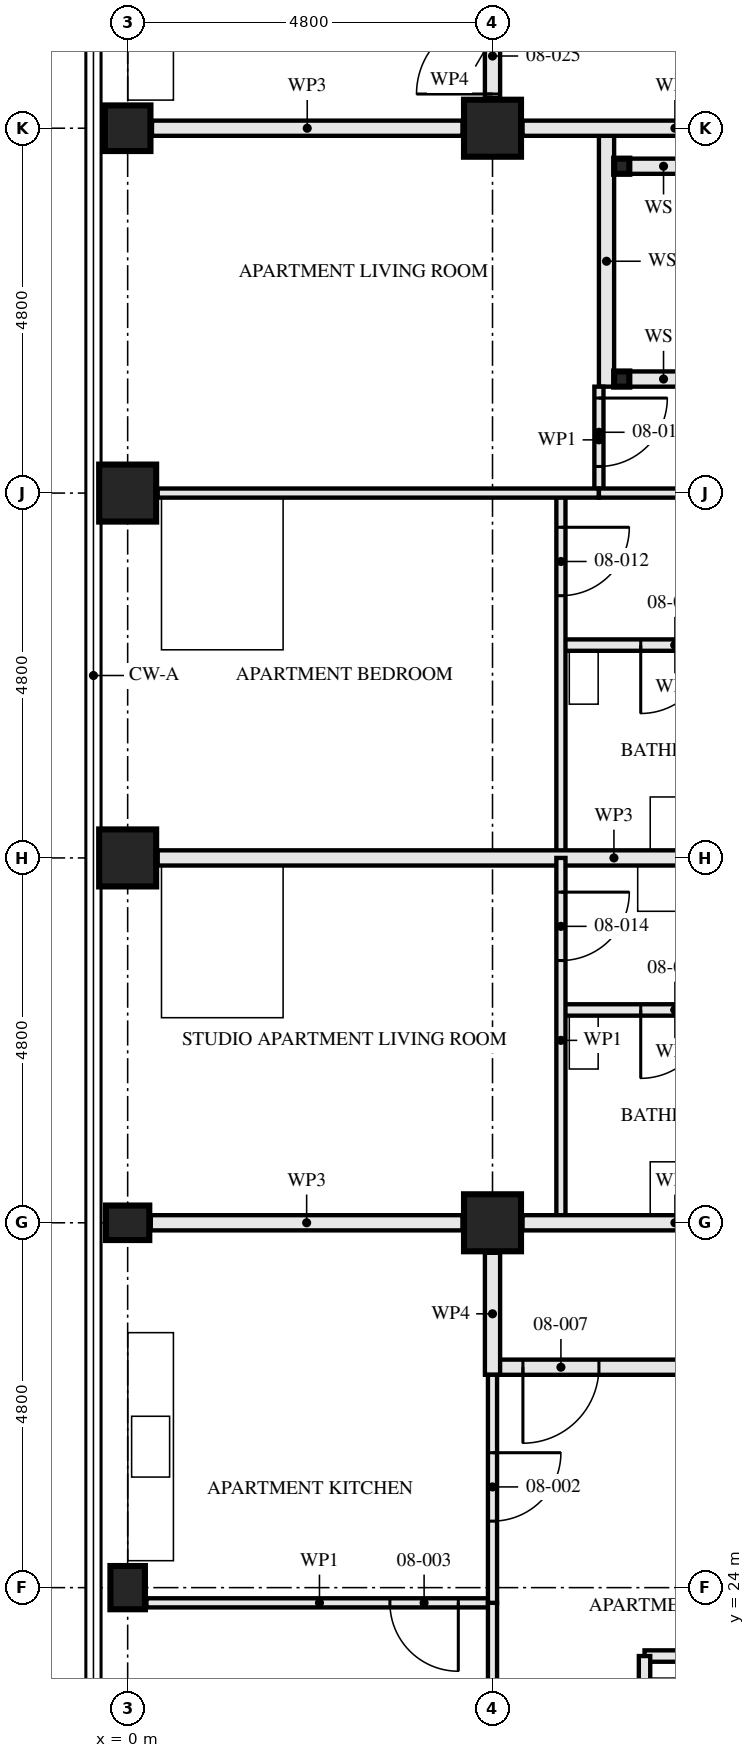
"""IFC4 building model, lengths in metres.
Left out: names, types, materials, properties, quantities, classifications, styles, units other than length and angle.
Written with IfcOpenShell. Run it as: python <this file> out.ifc"""

import sys

from ifc_helpers import new_model, si_unit, direction, frame, frame_2d, origin, origin_2d, place, context, subcontext, project, spatial, rectangle, hollow_rectangle, i_section, extrude, element, fill, save


model = new_model("IFC4")
c1 = context("Model", 3, precision=1e-05, world=origin(), true_north=direction((0.0, 1.0)))
c2 = subcontext(c1, "Body", "Model", "MODEL_VIEW")
j1 = project(units=[si_unit("LENGTHUNIT", "METRE"), si_unit("PLANEANGLEUNIT", "RADIAN")], contexts=[c1])
p1 = place(None, origin())
s1 = spatial("IfcSite", under=j1, at=p1, CompositionType="ELEMENT")
p2 = place(p1, origin())
s2 = spatial("IfcBuilding", under=s1, at=p2, CompositionType="ELEMENT")
p3 = place(p2, frame((0.0, 0.0, 34.0)))
s3 = spatial("IfcBuildingStorey", under=s2, at=p3, CompositionType="ELEMENT", Elevation=34.0)
for number, where, z_axis, x_axis in (
    (1, (0.0, 24.0, 0.0), (0.0, 0.0, 1.0), (1.0, 0.0, 0.0)),
    (2, (0.0, 28.8, 0.0), (0.0, 0.0, 1.0), (0.0, 1.0, 0.0)),
):
    element("IfcColumn", number, at=place(p3, frame(where, z_axis=z_axis, x_axis=x_axis)), inside=s3, PredefinedType="COLUMN", context=c2, shape_type="SweptSolid", body=[
        extrude(i_section(OverallWidth=0.454, OverallDepth=0.569, WebThickness=0.078, FlangeThickness=0.125, FilletRadius=0.015, at=origin_2d()), origin(), (0.0, 0.0, 1.0), 3.5),
    ])
for number, where, z_axis, x_axis in (
    (3, (0.0, 33.6, 0.0), (0.0, 0.0, 1.0), (1.0, 0.0, 0.0)),
    (4, (0.0, 38.4, 0.0), (0.0, 0.0, 1.0), (1.0, 0.0, 0.0)),
):
    element("IfcColumn", number, at=place(p3, frame(where, z_axis=z_axis, x_axis=x_axis)), inside=s3, PredefinedType="COLUMN", context=c2, shape_type="SweptSolid", body=[
        extrude(hollow_rectangle(XDim=0.75, YDim=0.75, WallThickness=0.08, at=origin_2d()), origin(), (0.0, 0.0, 1.0), 3.5),
    ])
p4 = place(p3, frame((0.0, 43.2, 0.0), z_axis=(0.0, 0.0, 1.0), x_axis=(0.0, 1.0, 0.0)))
e5 = element("IfcColumn", 5, at=p4, inside=s3, PredefinedType="COLUMN", context=c2, shape_type="SweptSolid", body=[
    extrude(hollow_rectangle(XDim=0.6, YDim=0.6, WallThickness=0.08, at=origin_2d()), origin(), (0.0, 0.0, 1.0), 3.5),
])
for number, where, z_axis, x_axis in (
    (6, (4.8, 28.8, 0.0), (0.0, 0.0, 1.0), (0.0, 1.0, 0.0)),
    (7, (4.8, 43.2, 0.0), (0.0, 0.0, 1.0), (0.0, 1.0, 0.0)),
):
    element("IfcColumn", number, at=place(p3, frame(where, z_axis=z_axis, x_axis=x_axis)), inside=s3, PredefinedType="COLUMN", context=c2, shape_type="SweptSolid", body=[
        extrude(hollow_rectangle(XDim=0.75, YDim=0.75, WallThickness=0.08, at=origin_2d()), origin(), (0.0, 0.0, 1.0), 3.5),
    ])
for number, where, z_axis, x_axis in (
    (8, (6.5, 42.7, 0.0), (0.0, 0.0, 1.0), (1.0, 0.0, 0.0)),
    (9, (6.5, 39.9, 0.0), (0.0, 0.0, 1.0), (1.0, 0.0, 0.0)),
):
    element("IfcColumn", number, at=place(p3, frame(where, z_axis=z_axis, x_axis=x_axis)), inside=s3, PredefinedType="COLUMN", context=c2, shape_type="SweptSolid", body=[
        extrude(hollow_rectangle(XDim=0.2, YDim=0.2, WallThickness=0.008, at=origin_2d()), origin(), (0.0, 0.0, 1.0), 3.33),
    ])
p5 = place(p3, frame((6.8, 20.1, 0.0), z_axis=(0.0, 0.0, 1.0), x_axis=(0.0, 1.0, 0.0)))
e10 = element("IfcWall", 10, at=p5, inside=s3, PredefinedType="PARTITIONING", context=c2, shape_type="SweptSolid", body=[
    extrude(rectangle(XDim=3.0, YDim=0.15, at=frame_2d((1.5, 0.0))), origin(), (0.0, 0.0, 1.0), 3.33),
])
p6 = place(p5, frame((1.05, 0.0, 0.0)))
e11 = element("IfcOpeningElement", 11, at=p6, cuts=e10, PredefinedType="OPENING", context=c2, shape_type="SweptSolid", body=[
    extrude(rectangle(XDim=0.9, YDim=2.1, at=frame_2d((0.45, 1.05))), frame((0.0, 0.085, 0.0), z_axis=(0.0, -1.0, 0.0), x_axis=(1.0, 0.0, 0.0)), (0.0, 0.0, 1.0), 0.171),
])
p7 = place(p3, frame((6.8, 23.1, 0.0), z_axis=(0.0, 0.0, 1.0), x_axis=(1.0, 0.0, 0.0)))
e12 = element("IfcWall", 12, at=p7, inside=s3, PredefinedType="PARTITIONING", context=c2, shape_type="SweptSolid", body=[
    extrude(rectangle(XDim=2.8, YDim=0.15, at=frame_2d((1.4, 0.0))), origin(), (0.0, 0.0, 1.0), 3.33),
])
p8 = place(p3, frame((4.8, 23.8, 0.0), z_axis=(0.0, 0.0, 1.0), x_axis=(0.0, 1.0, 0.0)))
e13 = element("IfcWall", 13, at=p8, inside=s3, PredefinedType="PARTITIONING", context=c2, shape_type="SweptSolid", body=[
    extrude(rectangle(XDim=3.0, YDim=0.12, at=frame_2d((1.5, 0.0))), origin(), (0.0, 0.0, 1.0), 2.55),
])
p9 = place(p8, frame((1.075, 0.0, 0.0)))
e14 = element("IfcOpeningElement", 14, at=p9, cuts=e13, PredefinedType="OPENING", context=c2, shape_type="SweptSolid", body=[
    extrude(rectangle(XDim=0.9, YDim=2.1, at=frame_2d((0.45, 1.05))), frame((0.0, 0.071, 0.0), z_axis=(0.0, -1.0, 0.0), x_axis=(1.0, 0.0, 0.0)), (0.0, 0.0, 1.0), 0.141),
])
p10 = place(p3, frame((0.247, 23.8, 0.0), z_axis=(0.0, 0.0, 1.0), x_axis=(1.0, 0.0, 0.0)))
e15 = element("IfcWall", 15, at=p10, inside=s3, PredefinedType="PARTITIONING", context=c2, shape_type="SweptSolid", body=[
    extrude(rectangle(XDim=4.553, YDim=0.12, at=frame_2d((2.276, 0.0))), origin(), (0.0, 0.0, 1.0), 3.33),
])
p11 = place(p10, frame((3.203, 0.0, 0.0)))
e16 = element("IfcOpeningElement", 16, at=p11, cuts=e15, PredefinedType="OPENING", context=c2, shape_type="SweptSolid", body=[
    extrude(rectangle(XDim=0.9, YDim=2.1, at=frame_2d((0.45, 1.05))), frame((0.0, 0.071, 0.0), z_axis=(0.0, -1.0, 0.0), x_axis=(1.0, 0.0, 0.0)), (0.0, 0.0, 1.0), 0.141),
])
p12 = place(p3, frame((4.8, 19.52, 0.0), z_axis=(0.0, 0.0, 1.0), x_axis=(0.0, 1.0, 0.0)))
e17 = element("IfcWall", 17, at=p12, inside=s3, PredefinedType="PARTITIONING", context=c2, shape_type="SweptSolid", body=[
    extrude(rectangle(XDim=4.28, YDim=0.12, at=frame_2d((2.14, 0.0))), origin(), (0.0, 0.0, 1.0), 3.33),
])
p13 = place(p3, frame((4.8, 26.9, 0.0), z_axis=(0.0, 0.0, 1.0), x_axis=(1.0, 0.0, 0.0)))
e18 = element("IfcWall", 18, at=p13, inside=s3, PredefinedType="PARTITIONING", context=c2, shape_type="SweptSolid", body=[
    extrude(rectangle(XDim=9.6, YDim=0.2, at=frame_2d((4.8, 0.0))), origin(), (0.0, 0.0, 1.0), 3.33),
])
p14 = place(p13, frame((0.4, 0.0, 0.0)))
e19 = element("IfcOpeningElement", 19, at=p14, cuts=e18, PredefinedType="OPENING", context=c2, shape_type="SweptSolid", body=[
    extrude(rectangle(XDim=1.0, YDim=2.1, at=frame_2d((0.5, 1.05))), frame((0.0, 0.111, 0.0), z_axis=(0.0, -1.0, 0.0), x_axis=(1.0, 0.0, 0.0)), (0.0, 0.0, 1.0), 0.221),
])
p15 = place(p13, frame((5.2, 0.0, 0.0)))
e20 = element("IfcOpeningElement", 20, at=p15, cuts=e18, PredefinedType="OPENING", context=c2, shape_type="SweptSolid", body=[
    extrude(rectangle(XDim=1.0, YDim=2.1, at=frame_2d((0.5, 1.05))), frame((0.0, 0.111, 0.0), z_axis=(0.0, -1.0, 0.0), x_axis=(1.0, 0.0, 0.0)), (0.0, 0.0, 1.0), 0.221),
])
p16 = place(p3, frame((4.8, 26.8, 0.0), z_axis=(0.0, 0.0, 1.0), x_axis=(0.0, 1.0, 0.0)))
e21 = element("IfcWall", 21, at=p16, inside=s3, PredefinedType="PARTITIONING", context=c2, shape_type="SweptSolid", body=[
    extrude(rectangle(XDim=1.605, YDim=0.2, at=frame_2d((0.802, 0.0))), origin(), (0.0, 0.0, 1.0), 3.33),
])
for number, where, z_axis, x_axis in (
    (22, (6.6, 42.7, 0.0), (0.0, 0.0, 1.0), (1.0, 0.0, 0.0)),
    (23, (6.6, 39.9, 0.0), (0.0, 0.0, 1.0), (1.0, 0.0, 0.0)),
):
    element("IfcWall", number, at=place(p3, frame(where, z_axis=z_axis, x_axis=x_axis)), inside=s3, PredefinedType="SOLIDWALL", context=c2, shape_type="SweptSolid", body=[
        extrude(rectangle(XDim=0.9, YDim=0.2, at=frame_2d((0.45, 0.0))), origin(), (0.0, 0.0, 1.0), 2.99),
    ])
p17 = place(p3, frame((6.3, 43.1, 0.0), z_axis=(0.0, 0.0, 1.0), x_axis=(0.0, -1.0, 0.0)))
e24 = element("IfcWall", 24, at=p17, inside=s3, PredefinedType="SOLIDWALL", context=c2, shape_type="SweptSolid", body=[
    extrude(rectangle(XDim=3.3, YDim=0.2, at=frame_2d((1.65, 0.0))), origin(), (0.0, 0.0, 1.0), 3.33),
])
p18 = place(p3, frame((5.7, 36.4, 0.0), z_axis=(0.0, 0.0, 1.0), x_axis=(1.0, 0.0, 0.0)))
e25 = element("IfcWall", 25, at=p18, inside=s3, PredefinedType="PARTITIONING", context=c2, shape_type="SweptSolid", body=[
    extrude(rectangle(XDim=3.0, YDim=0.15, at=frame_2d((1.5, 0.0))), origin(), (0.0, 0.0, 1.0), 3.33),
])
p19 = place(p18, frame((1.05, 0.0, 0.0)))
e26 = element("IfcOpeningElement", 26, at=p19, cuts=e25, PredefinedType="OPENING", context=c2, shape_type="SweptSolid", body=[
    extrude(rectangle(XDim=0.9, YDim=2.1, at=frame_2d((0.45, 1.05))), frame((0.0, 0.085, 0.0), z_axis=(0.0, -1.0, 0.0), x_axis=(1.0, 0.0, 0.0)), (0.0, 0.0, 1.0), 0.171),
])
p20 = place(p3, frame((6.2, 38.4, 0.0), z_axis=(0.0, 0.0, 1.0), x_axis=(1.0, 0.0, 0.0)))
e27 = element("IfcWall", 27, at=p20, inside=s3, PredefinedType="PARTITIONING", context=c2, shape_type="SweptSolid", body=[
    extrude(rectangle(XDim=6.25, YDim=0.12, at=frame_2d((3.125, 0.0))), origin(), (0.0, 0.0, 1.0), 2.55),
])
p21 = place(p20, frame((2.675, 0.0, 0.0)))
e28 = element("IfcOpeningElement", 28, at=p21, cuts=e27, PredefinedType="OPENING", context=c2, shape_type="SweptSolid", body=[
    extrude(rectangle(XDim=0.9, YDim=2.1, at=frame_2d((0.45, 1.05))), frame((0.0, 0.071, 0.0), z_axis=(0.0, -1.0, 0.0), x_axis=(1.0, 0.0, 0.0)), (0.0, 0.0, 1.0), 0.141),
])
p22 = place(p3, frame((6.2, 39.8, 0.0), z_axis=(0.0, 0.0, 1.0), x_axis=(0.0, -1.0, 0.0)))
e29 = element("IfcWall", 29, at=p22, inside=s3, PredefinedType="PARTITIONING", context=c2, shape_type="SweptSolid", body=[
    extrude(rectangle(XDim=1.4, YDim=0.12, at=frame_2d((0.7, 0.0))), origin(), (0.0, 0.0, 1.0), 3.33),
])
p23 = place(p22, frame((0.15, 0.0, 0.0)))
e30 = element("IfcOpeningElement", 30, at=p23, cuts=e29, PredefinedType="OPENING", context=c2, shape_type="SweptSolid", body=[
    extrude(rectangle(XDim=0.9, YDim=2.1, at=frame_2d((0.45, 1.05))), frame((0.0, 0.071, 0.0), z_axis=(0.0, -1.0, 0.0), x_axis=(1.0, 0.0, 0.0)), (0.0, 0.0, 1.0), 0.141),
])
p24 = place(p3, frame((5.7, 38.4, 0.0), z_axis=(0.0, 0.0, 1.0), x_axis=(0.0, -1.0, 0.0)))
e31 = element("IfcWall", 31, at=p24, inside=s3, PredefinedType="PARTITIONING", context=c2, shape_type="SweptSolid", body=[
    extrude(rectangle(XDim=4.8, YDim=0.12, at=frame_2d((2.4, 0.0))), origin(), (0.0, 0.0, 1.0), 3.33),
])
p25 = place(p24, frame((0.45, 0.0, 0.0)))
e32 = element("IfcOpeningElement", 32, at=p25, cuts=e31, PredefinedType="OPENING", context=c2, shape_type="SweptSolid", body=[
    extrude(rectangle(XDim=0.9, YDim=2.1, at=frame_2d((0.45, 1.05))), frame((0.0, 0.071, 0.0), z_axis=(0.0, -1.0, 0.0), x_axis=(1.0, 0.0, 0.0)), (0.0, 0.0, 1.0), 0.141),
])
p26 = place(p3, frame((0.395, 38.4, 0.0), z_axis=(0.0, 0.0, 1.0), x_axis=(1.0, 0.0, 0.0)))
e33 = element("IfcWall", 33, at=p26, inside=s3, PredefinedType="PARTITIONING", context=c2, shape_type="SweptSolid", body=[
    extrude(rectangle(XDim=5.805, YDim=0.12, at=frame_2d((2.902, 0.0))), origin(), (0.0, 0.0, 1.0), 2.55),
])
p27 = place(p3, frame((0.395, 33.6, 0.0), z_axis=(0.0, 0.0, 1.0), x_axis=(1.0, 0.0, 0.0)))
e34 = element("IfcWall", 34, at=p27, inside=s3, PredefinedType="PARTITIONING", context=c2, shape_type="SweptSolid", body=[
    extrude(rectangle(XDim=12.005, YDim=0.2, at=frame_2d((6.002, 0.0))), origin(), (0.0, 0.0, 1.0), 2.55),
])
p28 = place(p3, frame((5.7, 31.6, 0.0), z_axis=(0.0, 0.0, 1.0), x_axis=(1.0, 0.0, 0.0)))
e35 = element("IfcWall", 35, at=p28, inside=s3, PredefinedType="PARTITIONING", context=c2, shape_type="SweptSolid", body=[
    extrude(rectangle(XDim=3.0, YDim=0.15, at=frame_2d((1.5, 0.0))), origin(), (0.0, 0.0, 1.0), 3.33),
])
p29 = place(p28, frame((1.05, 0.0, 0.0)))
e36 = element("IfcOpeningElement", 36, at=p29, cuts=e35, PredefinedType="OPENING", context=c2, shape_type="SweptSolid", body=[
    extrude(rectangle(XDim=0.9, YDim=2.1, at=frame_2d((0.45, 1.05))), frame((0.0, 0.085, 0.0), z_axis=(0.0, -1.0, 0.0), x_axis=(1.0, 0.0, 0.0)), (0.0, 0.0, 1.0), 0.171),
])
p30 = place(p3, frame((5.7, 33.6, 0.0), z_axis=(0.0, 0.0, 1.0), x_axis=(0.0, -1.0, 0.0)))
e37 = element("IfcWall", 37, at=p30, inside=s3, PredefinedType="PARTITIONING", context=c2, shape_type="SweptSolid", body=[
    extrude(rectangle(XDim=4.8, YDim=0.12, at=frame_2d((2.4, 0.0))), origin(), (0.0, 0.0, 1.0), 3.33),
])
p31 = place(p30, frame((0.45, 0.0, 0.0)))
e38 = element("IfcOpeningElement", 38, at=p31, cuts=e37, PredefinedType="OPENING", context=c2, shape_type="SweptSolid", body=[
    extrude(rectangle(XDim=0.9, YDim=2.1, at=frame_2d((0.45, 1.05))), frame((0.0, 0.071, 0.0), z_axis=(0.0, -1.0, 0.0), x_axis=(1.0, 0.0, 0.0)), (0.0, 0.0, 1.0), 0.141),
])
p32 = place(p3, frame((4.8, 45.2, 0.0), z_axis=(0.0, 0.0, 1.0), x_axis=(0.0, -1.0, 0.0)))
e39 = element("IfcWall", 39, at=p32, inside=s3, PredefinedType="PARTITIONING", context=c2, shape_type="SweptSolid", body=[
    extrude(rectangle(XDim=1.605, YDim=0.2, at=frame_2d((0.802, 0.0))), origin(), (0.0, 0.0, 1.0), 3.33),
])
p33 = place(p32, frame((0.55, 0.0, 0.0)))
e40 = element("IfcOpeningElement", 40, at=p33, cuts=e39, PredefinedType="OPENING", context=c2, shape_type="SweptSolid", body=[
    extrude(rectangle(XDim=1.0, YDim=2.1, at=frame_2d((0.5, 1.05))), frame((0.0, 0.111, 0.0), z_axis=(0.0, -1.0, 0.0), x_axis=(1.0, 0.0, 0.0)), (0.0, 0.0, 1.0), 0.221),
])
p34 = place(p3, frame((9.205, 28.8, 0.0), z_axis=(0.0, 0.0, 1.0), x_axis=(-1.0, 0.0, 0.0)))
e41 = element("IfcWall", 41, at=p34, inside=s3, PredefinedType="PARTITIONING", context=c2, shape_type="SweptSolid", body=[
    extrude(rectangle(XDim=4.01, YDim=0.2, at=frame_2d((2.005, 0.0))), origin(), (0.0, 0.0, 1.0), 2.32),
])
p35 = place(p3, frame((4.405, 28.8, 0.0), z_axis=(0.0, 0.0, 1.0), x_axis=(-1.0, 0.0, 0.0)))
e42 = element("IfcWall", 42, at=p35, inside=s3, PredefinedType="PARTITIONING", context=c2, shape_type="SweptSolid", body=[
    extrude(rectangle(XDim=4.101, YDim=0.2, at=frame_2d((2.05, 0.0))), origin(), (0.0, 0.0, 1.0), 2.32),
])
p36 = place(p3, frame((9.205, 43.2, 0.0), z_axis=(0.0, 0.0, 1.0), x_axis=(-1.0, 0.0, 0.0)))
e43 = element("IfcWall", 43, at=p36, inside=s3, PredefinedType="PARTITIONING", context=c2, shape_type="SweptSolid", body=[
    extrude(rectangle(XDim=4.01, YDim=0.2, at=frame_2d((2.005, 0.0))), origin(), (0.0, 0.0, 1.0), 2.32),
])
p37 = place(p3, frame((4.405, 43.2, 0.0), z_axis=(0.0, 0.0, 1.0), x_axis=(-1.0, 0.0, 0.0)))
e44 = element("IfcWall", 44, at=p37, inside=s3, PredefinedType="PARTITIONING", context=c2, shape_type="SweptSolid", body=[
    extrude(rectangle(XDim=4.085, YDim=0.2, at=frame_2d((2.042, 0.0))), origin(), (0.0, 0.0, 1.0), 2.32),
])
p38 = place(p9, frame((0.9, 0.0, 0.0), z_axis=(0.0, 0.0, 1.0), x_axis=(-1.0, 0.0, 0.0)))
e45 = element("IfcDoor", 45, at=p38, inside=s3, OperationType="SINGLE_SWING_RIGHT", PredefinedType="DOOR", context=c2, shape_type="SweptSolid", body=[
    extrude(rectangle(XDim=0.9, YDim=2.1, at=frame_2d((0.45, 1.05))), frame((0.0, 0.022, 0.0), z_axis=(0.0, -1.0, 0.0), x_axis=(1.0, 0.0, 0.0)), (0.0, 0.0, 1.0), 0.044),
])
fill(e14, e45)
p39 = place(p11, frame((0.9, 0.0, 0.0), z_axis=(0.0, 0.0, 1.0), x_axis=(-1.0, 0.0, 0.0)))
e46 = element("IfcDoor", 46, at=p39, inside=s3, OperationType="SINGLE_SWING_RIGHT", PredefinedType="DOOR", context=c2, shape_type="SweptSolid", body=[
    extrude(rectangle(XDim=0.9, YDim=2.1, at=frame_2d((0.45, 1.05))), frame((0.0, 0.022, 0.0), z_axis=(0.0, -1.0, 0.0), x_axis=(1.0, 0.0, 0.0)), (0.0, 0.0, 1.0), 0.044),
])
fill(e16, e46)
p40 = place(p14, frame((1.0, 0.0, 0.0), z_axis=(0.0, 0.0, 1.0), x_axis=(-1.0, 0.0, 0.0)))
e47 = element("IfcDoor", 47, at=p40, inside=s3, OperationType="SINGLE_SWING_LEFT", PredefinedType="DOOR", context=c2, shape_type="SweptSolid", body=[
    extrude(rectangle(XDim=1.0, YDim=2.1, at=frame_2d((0.5, 1.05))), frame((0.0, 0.027, 0.0), z_axis=(0.0, -1.0, 0.0), x_axis=(1.0, 0.0, 0.0)), (0.0, 0.0, 1.0), 0.054),
])
fill(e19, e47)
p41 = place(p19, frame((0.9, 0.0, 0.0), z_axis=(0.0, 0.0, 1.0), x_axis=(-1.0, 0.0, 0.0)))
e48 = element("IfcDoor", 48, at=p41, inside=s3, OperationType="SINGLE_SWING_LEFT", PredefinedType="DOOR", context=c2, shape_type="SweptSolid", body=[
    extrude(rectangle(XDim=0.9, YDim=2.1, at=frame_2d((0.45, 1.05))), frame((0.0, 0.022, 0.0), z_axis=(0.0, -1.0, 0.0), x_axis=(1.0, 0.0, 0.0)), (0.0, 0.0, 1.0), 0.044),
])
fill(e26, e48)
p42 = place(p23, origin())
e49 = element("IfcDoor", 49, at=p42, inside=s3, OperationType="SINGLE_SWING_RIGHT", PredefinedType="DOOR", context=c2, shape_type="SweptSolid", body=[
    extrude(rectangle(XDim=0.9, YDim=2.1, at=frame_2d((0.45, 1.05))), frame((0.0, 0.022, 0.0), z_axis=(0.0, -1.0, 0.0), x_axis=(1.0, 0.0, 0.0)), (0.0, 0.0, 1.0), 0.044),
])
fill(e30, e49)
p43 = place(p25, origin())
e50 = element("IfcDoor", 50, at=p43, inside=s3, OperationType="SINGLE_SWING_RIGHT", PredefinedType="DOOR", context=c2, shape_type="SweptSolid", body=[
    extrude(rectangle(XDim=0.9, YDim=2.1, at=frame_2d((0.45, 1.05))), frame((0.0, 0.022, 0.0), z_axis=(0.0, -1.0, 0.0), x_axis=(1.0, 0.0, 0.0)), (0.0, 0.0, 1.0), 0.044),
])
fill(e32, e50)
p44 = place(p29, frame((0.9, 0.0, 0.0), z_axis=(0.0, 0.0, 1.0), x_axis=(-1.0, 0.0, 0.0)))
e51 = element("IfcDoor", 51, at=p44, inside=s3, OperationType="SINGLE_SWING_LEFT", PredefinedType="DOOR", context=c2, shape_type="SweptSolid", body=[
    extrude(rectangle(XDim=0.9, YDim=2.1, at=frame_2d((0.45, 1.05))), frame((0.0, 0.022, 0.0), z_axis=(0.0, -1.0, 0.0), x_axis=(1.0, 0.0, 0.0)), (0.0, 0.0, 1.0), 0.044),
])
fill(e36, e51)
p45 = place(p31, origin())
e52 = element("IfcDoor", 52, at=p45, inside=s3, OperationType="SINGLE_SWING_RIGHT", PredefinedType="DOOR", context=c2, shape_type="SweptSolid", body=[
    extrude(rectangle(XDim=0.9, YDim=2.1, at=frame_2d((0.45, 1.05))), frame((0.0, 0.022, 0.0), z_axis=(0.0, -1.0, 0.0), x_axis=(1.0, 0.0, 0.0)), (0.0, 0.0, 1.0), 0.044),
])
fill(e38, e52)
p46 = place(p33, frame((1.0, 0.0, 0.0), z_axis=(0.0, 0.0, 1.0), x_axis=(-1.0, 0.0, 0.0)))
e53 = element("IfcDoor", 53, at=p46, inside=s3, OperationType="SINGLE_SWING_RIGHT", PredefinedType="DOOR", context=c2, shape_type="SweptSolid", body=[
    extrude(rectangle(XDim=1.0, YDim=2.1, at=frame_2d((0.5, 1.05))), frame((0.0, 0.027, 0.0), z_axis=(0.0, -1.0, 0.0), x_axis=(1.0, 0.0, 0.0)), (0.0, 0.0, 1.0), 0.054),
])
fill(e40, e53)
save(model, sys.argv[1])
